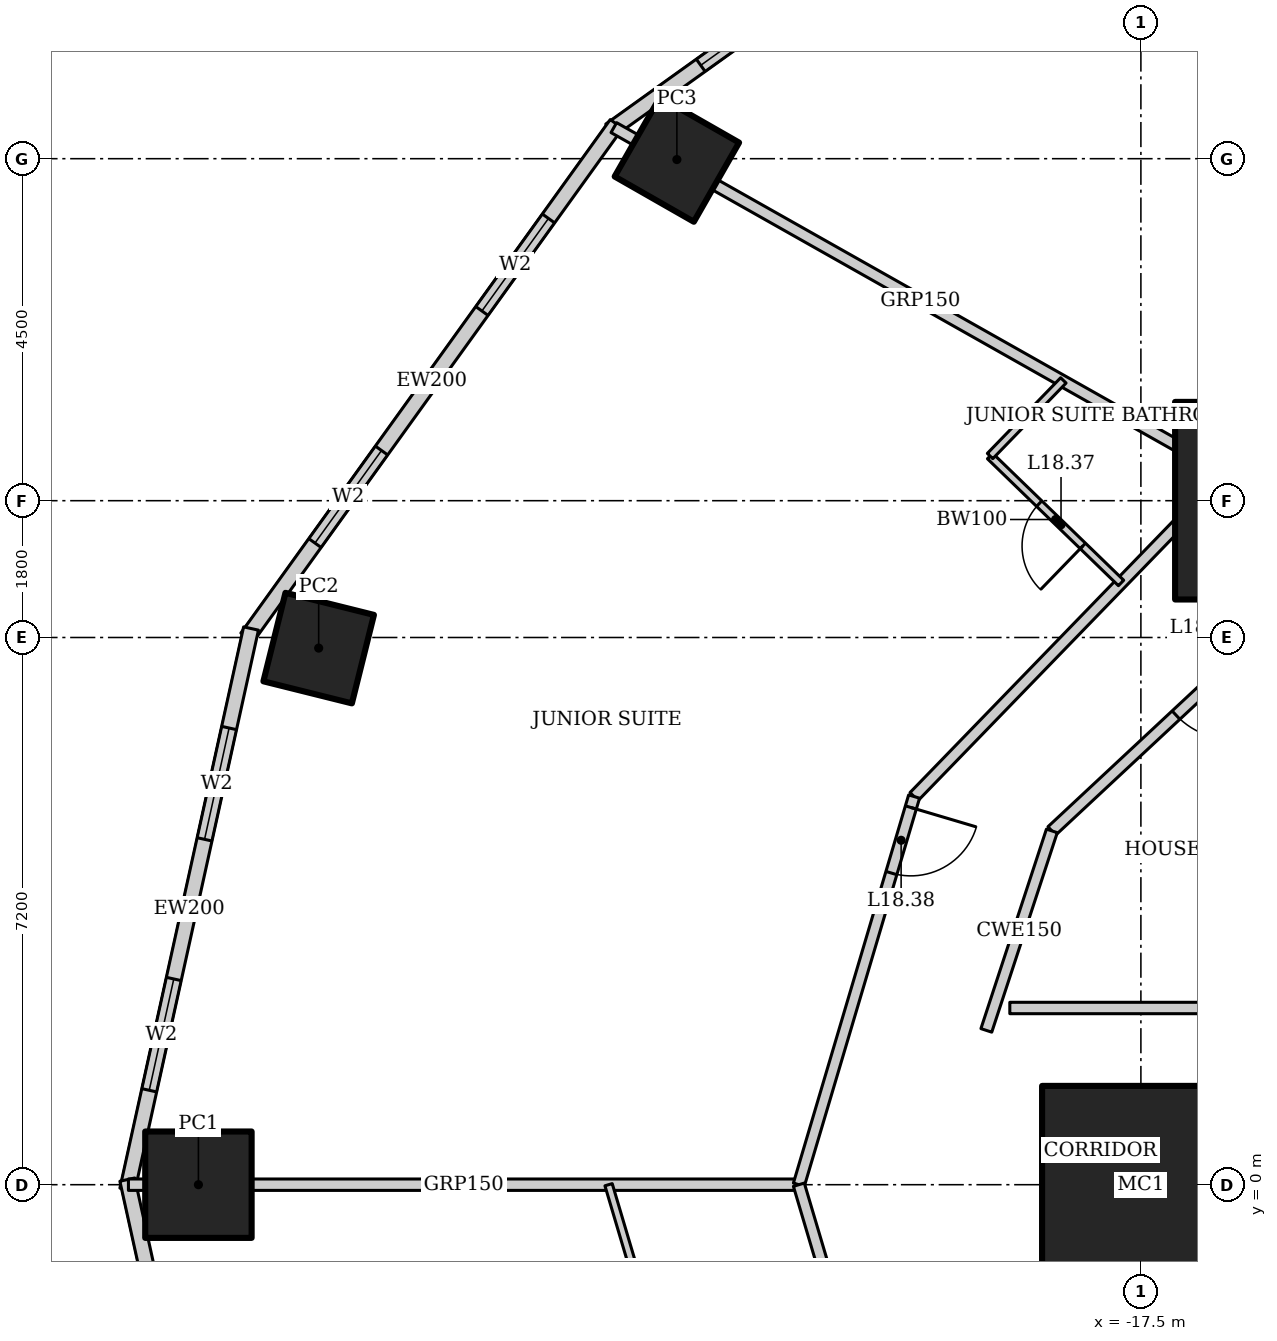
"""IFC4 building model, lengths in metres.
Left out: names, types, materials, properties, quantities, classifications, styles, units other than length and angle.
Written with IfcOpenShell. Run it as: python <this file> out.ifc"""

import sys

from ifc_helpers import new_model, si_unit, direction, frame, frame_2d, origin, origin_2d, place, context, subcontext, project, spatial, rectangle, hollow_rectangle, extrude, element, fill, save


model = new_model("IFC4")
c1 = context("Model", 3, precision=1e-05, world=origin(), true_north=direction((0.0, 1.0)))
c2 = subcontext(c1, "Body", "Model", "MODEL_VIEW")
j1 = project(units=[si_unit("LENGTHUNIT", "METRE"), si_unit("PLANEANGLEUNIT", "RADIAN")], contexts=[c1])
p1 = place(None, origin())
s1 = spatial("IfcSite", under=j1, at=p1, CompositionType="ELEMENT")
p2 = place(p1, origin())
s2 = spatial("IfcBuilding", under=s1, at=p2, CompositionType="ELEMENT")
p3 = place(p2, frame((0.0, 0.0, 80.2)))
s3 = spatial("IfcBuildingStorey", under=s2, at=p3, CompositionType="ELEMENT", Elevation=80.2)
for number, where, z_axis, x_axis in (
    (1, (-15.75, 9.0, 0.0), (0.0, 0.0, 1.0), (1.0, 0.0, 0.0)),
    (2, (-17.5, 0.0, 0.0), (0.0, 0.0, 1.0), (1.0, 0.0, 0.0)),
):
    element("IfcColumn", number, at=place(p3, frame(where, z_axis=z_axis, x_axis=x_axis)), inside=s3, PredefinedType="COLUMN", context=c2, shape_type="SweptSolid", body=[
        extrude(hollow_rectangle(XDim=2.6, YDim=2.6, WallThickness=0.13, at=origin_2d()), origin(), (0.0, 0.0, 1.0), 3.6),
    ])
p4 = place(p3, frame((-23.605, 13.489, 0.0), z_axis=(0.0, 0.0, 1.0), x_axis=(0.496139221777, 0.86824298017, 0.0)))
e3 = element("IfcColumn", 3, at=p4, inside=s3, PredefinedType="COLUMN", context=c2, shape_type="SweptSolid", body=[
    extrude(hollow_rectangle(XDim=1.2, YDim=1.2, WallThickness=0.12, at=origin_2d()), origin(), (0.0, 0.0, 1.0), 3.6),
])
p5 = place(p3, frame((-28.318, 7.06, 0.0), z_axis=(0.0, 0.0, 1.0), x_axis=(0.2419218956, 0.970295726276, 0.0)))
e4 = element("IfcColumn", 4, at=p5, inside=s3, PredefinedType="COLUMN", context=c2, shape_type="SweptSolid", body=[
    extrude(hollow_rectangle(XDim=1.2, YDim=1.2, WallThickness=0.1, at=origin_2d()), origin(), (0.0, 0.0, 1.0), 3.6),
])
p6 = place(p3, frame((-29.9, 0.0, 0.0), z_axis=(0.0, 0.0, 1.0), x_axis=(1.0, 0.0, 0.0)))
e5 = element("IfcColumn", 5, at=p6, inside=s3, PredefinedType="COLUMN", context=c2, shape_type="SweptSolid", body=[
    extrude(hollow_rectangle(XDim=1.4, YDim=1.4, WallThickness=0.1, at=origin_2d()), origin(), (0.0, 0.0, 1.0), 3.6),
])
p7 = place(p3, frame((-17.929, 18.572, 0.0), z_axis=(0.0, 0.0, 1.0), x_axis=(-0.812791321576, -0.582554948112, 0.0)))
e6 = element("IfcWall", 6, at=p7, inside=s3, PredefinedType="SOLIDWALL", context=c2, shape_type="SweptSolid", body=[
    extrude(rectangle(XDim=8.063, YDim=0.2, at=frame_2d((4.032, 0.0))), origin(), (0.0, 0.0, 1.0), 3.45),
])
p8 = place(p7, frame((1.466, 0.0, 0.5)))
e7 = element("IfcOpeningElement", 7, at=p8, cuts=e6, PredefinedType="OPENING", context=c2, shape_type="SweptSolid", body=[
    extrude(rectangle(XDim=1.5, YDim=2.2, at=frame_2d((0.75, 1.1))), frame((0.0, 0.11, 0.0), z_axis=(0.0, -1.0, 0.0), x_axis=(1.0, 0.0, 0.0)), (0.0, 0.0, 1.0), 0.22),
])
p9 = place(p7, frame((5.097, 0.0, 0.5)))
e8 = element("IfcOpeningElement", 8, at=p9, cuts=e6, PredefinedType="OPENING", context=c2, shape_type="SweptSolid", body=[
    extrude(rectangle(XDim=1.5, YDim=2.2, at=frame_2d((0.75, 1.1))), frame((0.0, 0.11, 0.0), z_axis=(0.0, -1.0, 0.0), x_axis=(1.0, 0.0, 0.0)), (0.0, 0.0, 1.0), 0.22),
])
p10 = place(p3, frame((-24.4, 13.957, 0.0), z_axis=(0.0, 0.0, 1.0), x_axis=(-0.583937613703, -0.811798536155, 0.0)))
e9 = element("IfcWall", 9, at=p10, inside=s3, PredefinedType="SOLIDWALL", context=c2, shape_type="SweptSolid", body=[
    extrude(rectangle(XDim=8.323, YDim=0.2, at=frame_2d((4.162, 0.0))), origin(), (0.0, 0.0, 1.0), 3.45),
])
p11 = place(p10, frame((1.531, 0.0, 0.5)))
e10 = element("IfcOpeningElement", 10, at=p11, cuts=e9, PredefinedType="OPENING", context=c2, shape_type="SweptSolid", body=[
    extrude(rectangle(XDim=1.5, YDim=2.2, at=frame_2d((0.75, 1.1))), frame((0.0, 0.11, 0.0), z_axis=(0.0, -1.0, 0.0), x_axis=(1.0, 0.0, 0.0)), (0.0, 0.0, 1.0), 0.22),
])
p12 = place(p10, frame((5.292, 0.0, 0.5)))
e11 = element("IfcOpeningElement", 11, at=p12, cuts=e9, PredefinedType="OPENING", context=c2, shape_type="SweptSolid", body=[
    extrude(rectangle(XDim=1.5, YDim=2.2, at=frame_2d((0.75, 1.1))), frame((0.0, 0.11, 0.0), z_axis=(0.0, -1.0, 0.0), x_axis=(1.0, 0.0, 0.0)), (0.0, 0.0, 1.0), 0.22),
])
p13 = place(p3, frame((-29.208, 7.318, 0.0), z_axis=(0.0, 0.0, 1.0), x_axis=(-0.215238065514, -0.976561608478, 0.0)))
e12 = element("IfcWall", 12, at=p13, inside=s3, PredefinedType="SOLIDWALL", context=c2, shape_type="SweptSolid", body=[
    extrude(rectangle(XDim=7.562, YDim=0.2, at=frame_2d((3.781, 0.0))), origin(), (0.0, 0.0, 1.0), 3.45),
])
p14 = place(p13, frame((1.341, 0.0, 0.5)))
e13 = element("IfcOpeningElement", 13, at=p14, cuts=e12, PredefinedType="OPENING", context=c2, shape_type="SweptSolid", body=[
    extrude(rectangle(XDim=1.5, YDim=2.2, at=frame_2d((0.75, 1.1))), frame((0.0, 0.11, 0.0), z_axis=(0.0, -1.0, 0.0), x_axis=(1.0, 0.0, 0.0)), (0.0, 0.0, 1.0), 0.22),
])
p15 = place(p13, frame((4.722, 0.0, 0.5)))
e14 = element("IfcOpeningElement", 14, at=p15, cuts=e12, PredefinedType="OPENING", context=c2, shape_type="SweptSolid", body=[
    extrude(rectangle(XDim=1.5, YDim=2.2, at=frame_2d((0.75, 1.1))), frame((0.0, 0.11, 0.0), z_axis=(0.0, -1.0, 0.0), x_axis=(1.0, 0.0, 0.0)), (0.0, 0.0, 1.0), 0.22),
])
p16 = place(p3, frame((-30.835, 0.067, 0.0), z_axis=(0.0, 0.0, 1.0), x_axis=(0.215238065514, -0.976561608478, 0.0)))
e15 = element("IfcWall", 15, at=p16, inside=s3, PredefinedType="SOLIDWALL", context=c2, shape_type="SweptSolid", body=[
    extrude(rectangle(XDim=7.562, YDim=0.2, at=frame_2d((3.781, 0.0))), origin(), (0.0, 0.0, 1.0), 3.45),
])
p17 = place(p16, frame((1.341, 0.0, 0.5)))
e16 = element("IfcOpeningElement", 16, at=p17, cuts=e15, PredefinedType="OPENING", context=c2, shape_type="SweptSolid", body=[
    extrude(rectangle(XDim=1.5, YDim=2.2, at=frame_2d((0.75, 1.1))), frame((0.0, 0.11, 0.0), z_axis=(0.0, -1.0, 0.0), x_axis=(1.0, 0.0, 0.0)), (0.0, 0.0, 1.0), 0.22),
])
p18 = place(p16, frame((4.722, 0.0, 0.5)))
e17 = element("IfcOpeningElement", 17, at=p18, cuts=e15, PredefinedType="OPENING", context=c2, shape_type="SweptSolid", body=[
    extrude(rectangle(XDim=1.5, YDim=2.2, at=frame_2d((0.75, 1.1))), frame((0.0, 0.11, 0.0), z_axis=(0.0, -1.0, 0.0), x_axis=(1.0, 0.0, 0.0)), (0.0, 0.0, 1.0), 0.22),
])
p19 = place(p3, frame((-24.435, 13.909, 0.0), z_axis=(0.0, 0.0, 1.0), x_axis=(0.870744406136, -0.491735883563, 0.0)))
e18 = element("IfcWall", 18, at=p19, inside=s3, PredefinedType="PARTITIONING", context=c2, shape_type="SweptSolid", body=[
    extrude(rectangle(XDim=9.263, YDim=0.15, at=frame_2d((4.631, 0.0))), origin(), (0.0, 0.0, 1.0), 2.693),
])
p20 = place(p3, frame((-30.821, 0.0, 0.0), z_axis=(0.0, 0.0, 1.0), x_axis=(1.0, 0.0, 0.0)))
e19 = element("IfcWall", 19, at=p20, inside=s3, PredefinedType="PARTITIONING", context=c2, shape_type="SweptSolid", body=[
    extrude(rectangle(XDim=8.821, YDim=0.15, at=frame_2d((4.41, 0.0))), origin(), (0.0, 0.0, 1.0), 2.528),
])
p21 = place(p3, frame((-16.369, 9.354, 0.0), z_axis=(0.0, 0.0, 1.0), x_axis=(-0.695871090686, -0.71816671125, 0.0)))
e20 = element("IfcWall", 20, at=p21, inside=s3, PredefinedType="PARTITIONING", context=c2, shape_type="SweptSolid", body=[
    extrude(rectangle(XDim=5.913, YDim=0.15, at=frame_2d((2.957, 0.0))), origin(), (0.0, 0.0, 1.0), 3.45),
])
p22 = place(p3, frame((-20.484, 5.107, 0.0), z_axis=(0.0, 0.0, 1.0), x_axis=(-0.284584469409, -0.95865096869, 0.0)))
e21 = element("IfcWall", 21, at=p22, inside=s3, PredefinedType="PARTITIONING", context=c2, shape_type="SweptSolid", body=[
    extrude(rectangle(XDim=5.327, YDim=0.15, at=frame_2d((2.664, 0.0))), origin(), (0.0, 0.0, 1.0), 3.45),
])
p23 = place(p22, frame((0.15, 0.0, 0.0)))
e22 = element("IfcOpeningElement", 22, at=p23, cuts=e21, PredefinedType="OPENING", context=c2, shape_type="SweptSolid", body=[
    extrude(rectangle(XDim=0.9, YDim=2.1, at=frame_2d((0.45, 1.05))), frame((0.0, 0.085, 0.0), z_axis=(0.0, -1.0, 0.0), x_axis=(1.0, 0.0, 0.0)), (0.0, 0.0, 1.0), 0.17),
])
p24 = place(p3, frame((-22.0, 0.0, 0.0), z_axis=(0.0, 0.0, 1.0), x_axis=(0.284584469409, -0.95865096869, 0.0)))
e23 = element("IfcWall", 23, at=p24, inside=s3, PredefinedType="PARTITIONING", context=c2, shape_type="SweptSolid", body=[
    extrude(rectangle(XDim=5.327, YDim=0.15, at=frame_2d((2.664, 0.0))), origin(), (0.0, 0.0, 1.0), 3.45),
])
p25 = place(p3, frame((-14.673, 8.385, 0.0), z_axis=(0.0, 0.0, 1.0), x_axis=(-0.731260145007, -0.682098673452, 0.0)))
e24 = element("IfcWall", 24, at=p25, inside=s3, PredefinedType="PARTITIONING", context=c2, shape_type="SweptSolid", body=[
    extrude(rectangle(XDim=5.468, YDim=0.15, at=frame_2d((2.734, 0.0))), origin(), (0.0, 0.0, 1.0), 3.45),
])
p26 = place(p25, frame((2.234, 0.0, 0.0)))
e25 = element("IfcOpeningElement", 25, at=p26, cuts=e24, PredefinedType="OPENING", context=c2, shape_type="SweptSolid", body=[
    extrude(rectangle(XDim=1.0, YDim=2.1, at=frame_2d((0.5, 1.05))), frame((0.0, 0.085, 0.0), z_axis=(0.0, -1.0, 0.0), x_axis=(1.0, 0.0, 0.0)), (0.0, 0.0, 1.0), 0.17),
])
p27 = place(p3, frame((-17.761, 7.917, 0.0), z_axis=(0.0, 0.0, 1.0), x_axis=(-0.718157610206, 0.695880483204, 0.0)))
e26 = element("IfcWall", 26, at=p27, inside=s3, PredefinedType="PARTITIONING", context=c2, shape_type="SweptSolid", body=[
    extrude(rectangle(XDim=2.4, YDim=0.1, at=frame_2d((1.2, 0.0))), origin(), (0.0, 0.0, 1.0), 3.45),
])
p28 = place(p27, frame((0.7, 0.0, 0.0)))
e27 = element("IfcOpeningElement", 27, at=p28, cuts=e26, PredefinedType="OPENING", context=c2, shape_type="SweptSolid", body=[
    extrude(rectangle(XDim=0.8, YDim=2.1, at=frame_2d((0.4, 1.05))), frame((0.0, 0.06, 0.0), z_axis=(0.0, -1.0, 0.0), x_axis=(1.0, 0.0, 0.0)), (0.0, 0.0, 1.0), 0.12),
])
p29 = place(p3, frame((-19.484, 9.588, 0.0), z_axis=(0.0, 0.0, 1.0), x_axis=(0.695920174922, 0.718119147591, 0.0)))
e28 = element("IfcWall", 28, at=p29, inside=s3, PredefinedType="PARTITIONING", context=c2, shape_type="SweptSolid", body=[
    extrude(rectangle(XDim=1.386, YDim=0.1, at=frame_2d((0.693, 0.0))), origin(), (0.0, 0.0, 1.0), 3.45),
])
p30 = place(p3, frame((-23.732, -2.6, 0.0), z_axis=(0.0, 0.0, 1.0), x_axis=(-0.284514277473, 0.958671803025, 0.0)))
e29 = element("IfcWall", 29, at=p30, inside=s3, PredefinedType="PARTITIONING", context=c2, shape_type="SweptSolid", body=[
    extrude(rectangle(XDim=2.712, YDim=0.1, at=frame_2d((1.356, 0.0))), origin(), (0.0, 0.0, 1.0), 3.45),
])
p31 = place(p3, frame((-18.672, 4.655, 0.0), z_axis=(0.0, 0.0, 1.0), x_axis=(-0.311929965981, -0.950105097515, 0.0)))
e30 = element("IfcWall", 30, at=p31, inside=s3, PredefinedType="PARTITIONING", context=c2, shape_type="SweptSolid", body=[
    extrude(rectangle(XDim=2.763, YDim=0.15, at=frame_2d((1.381, 0.0))), origin(), (0.0, 0.0, 1.0), 3.45),
])
p32 = place(p3, frame((-19.225, 2.325, 0.0), z_axis=(0.0, 0.0, 1.0), x_axis=(1.0, 0.0, 0.0)))
e31 = element("IfcWall", 31, at=p32, inside=s3, PredefinedType="PARTITIONING", context=c2, shape_type="SweptSolid", body=[
    extrude(rectangle(XDim=3.449, YDim=0.15, at=frame_2d((1.725, 0.0))), origin(), (0.0, 0.0, 1.0), 3.45),
])
p33 = place(p9, origin())
e32 = element("IfcWindow", 32, at=p33, inside=s3, PartitioningType="SINGLE_PANEL", PredefinedType="WINDOW", context=c2, shape_type="SweptSolid", body=[
    extrude(rectangle(XDim=1.5, YDim=2.2, at=frame_2d((0.75, 1.1))), frame((0.0, 0.03, 0.0), z_axis=(0.0, -1.0, 0.0), x_axis=(1.0, 0.0, 0.0)), (0.0, 0.0, 1.0), 0.06),
])
fill(e8, e32)
p34 = place(p11, origin())
e33 = element("IfcWindow", 33, at=p34, inside=s3, PartitioningType="SINGLE_PANEL", PredefinedType="WINDOW", context=c2, shape_type="SweptSolid", body=[
    extrude(rectangle(XDim=1.5, YDim=2.2, at=frame_2d((0.75, 1.1))), frame((0.0, 0.03, 0.0), z_axis=(0.0, -1.0, 0.0), x_axis=(1.0, 0.0, 0.0)), (0.0, 0.0, 1.0), 0.06),
])
fill(e10, e33)
p35 = place(p12, origin())
e34 = element("IfcWindow", 34, at=p35, inside=s3, PartitioningType="SINGLE_PANEL", PredefinedType="WINDOW", context=c2, shape_type="SweptSolid", body=[
    extrude(rectangle(XDim=1.5, YDim=2.2, at=frame_2d((0.75, 1.1))), frame((0.0, 0.03, 0.0), z_axis=(0.0, -1.0, 0.0), x_axis=(1.0, 0.0, 0.0)), (0.0, 0.0, 1.0), 0.06),
])
fill(e11, e34)
p36 = place(p14, origin())
e35 = element("IfcWindow", 35, at=p36, inside=s3, PartitioningType="SINGLE_PANEL", PredefinedType="WINDOW", context=c2, shape_type="SweptSolid", body=[
    extrude(rectangle(XDim=1.5, YDim=2.2, at=frame_2d((0.75, 1.1))), frame((0.0, 0.03, 0.0), z_axis=(0.0, -1.0, 0.0), x_axis=(1.0, 0.0, 0.0)), (0.0, 0.0, 1.0), 0.06),
])
fill(e13, e35)
p37 = place(p15, origin())
e36 = element("IfcWindow", 36, at=p37, inside=s3, PartitioningType="SINGLE_PANEL", PredefinedType="WINDOW", context=c2, shape_type="SweptSolid", body=[
    extrude(rectangle(XDim=1.5, YDim=2.2, at=frame_2d((0.75, 1.1))), frame((0.0, 0.03, 0.0), z_axis=(0.0, -1.0, 0.0), x_axis=(1.0, 0.0, 0.0)), (0.0, 0.0, 1.0), 0.06),
])
fill(e14, e36)
p38 = place(p26, origin())
e37 = element("IfcDoor", 37, at=p38, inside=s3, OperationType="SINGLE_SWING_LEFT", PredefinedType="DOOR", context=c2, shape_type="SweptSolid", body=[
    extrude(rectangle(XDim=1.0, YDim=2.1, at=frame_2d((0.5, 1.05))), frame((0.0, 0.025, 0.0), z_axis=(0.0, -1.0, 0.0), x_axis=(1.0, 0.0, 0.0)), (0.0, 0.0, 1.0), 0.05),
])
fill(e25, e37)
p39 = place(p28, origin())
e38 = element("IfcDoor", 38, at=p39, inside=s3, OperationType="SINGLE_SWING_LEFT", PredefinedType="DOOR", context=c2, shape_type="SweptSolid", body=[
    extrude(rectangle(XDim=0.8, YDim=2.1, at=frame_2d((0.4, 1.05))), frame((0.0, 0.025, 0.0), z_axis=(0.0, -1.0, 0.0), x_axis=(1.0, 0.0, 0.0)), (0.0, 0.0, 1.0), 0.05),
])
fill(e27, e38)
p40 = place(p23, origin())
e39 = element("IfcDoor", 39, at=p40, inside=s3, OperationType="SINGLE_SWING_LEFT", PredefinedType="DOOR", context=c2, shape_type="SweptSolid", body=[
    extrude(rectangle(XDim=0.9, YDim=2.1, at=frame_2d((0.45, 1.05))), frame((0.0, 0.025, 0.0), z_axis=(0.0, -1.0, 0.0), x_axis=(1.0, 0.0, 0.0)), (0.0, 0.0, 1.0), 0.05),
])
fill(e22, e39)
save(model, sys.argv[1])
